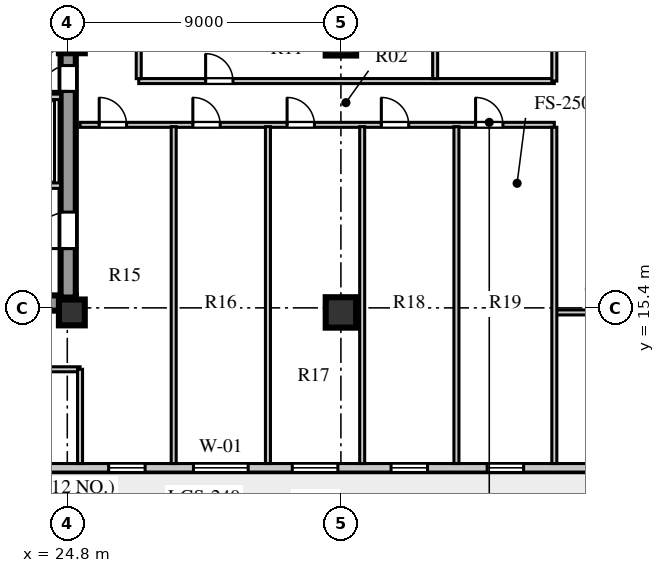
"""IFC4 building model, lengths in metres.
Left out: names, types, materials, properties, quantities, classifications, styles, units other than length and angle.
Written with IfcOpenShell. Run it as: python <this file> out.ifc"""

import sys

from ifc_helpers import new_model, si_unit, direction, frame, frame_2d, origin, origin_2d, place, context, subcontext, project, spatial, rectangle, extrude, element, fill, save


model = new_model("IFC4")
c1 = context("Model", 3, precision=1e-05, world=origin(), true_north=direction((0.0, 1.0)))
c2 = subcontext(c1, "Body", "Model", "MODEL_VIEW")
j1 = project(units=[si_unit("LENGTHUNIT", "METRE"), si_unit("PLANEANGLEUNIT", "RADIAN")], contexts=[c1])
p1 = place(None, origin())
s1 = spatial("IfcSite", under=j1, at=p1, CompositionType="ELEMENT")
p2 = place(p1, origin())
s2 = spatial("IfcBuilding", under=s1, at=p2, CompositionType="ELEMENT")
p3 = place(p2, frame((0.0, 0.0, 142.5)))
s3 = spatial("IfcBuildingStorey", under=s2, at=p3, CompositionType="ELEMENT", Elevation=142.5)
p4 = place(p3, frame((15.4, 15.56, 0.0), z_axis=(0.0, 0.0, 1.0), x_axis=(1.0, 0.0, 0.0)))
e1 = element("IfcWall", 1, at=p4, inside=s3, PredefinedType="SHEAR", context=c2, shape_type="SweptSolid", body=[
    extrude(rectangle(XDim=9.68, YDim=0.5, at=frame_2d((4.84, 0.0))), origin(), (0.0, 0.0, 1.0), 3.6),
])
p5 = place(p3, frame((24.83, 15.74, 0.0), z_axis=(0.0, 0.0, 1.0), x_axis=(0.0, 1.0, 0.0)))
e2 = element("IfcWall", 2, at=p5, inside=s3, PredefinedType="SHEAR", context=c2, shape_type="SweptSolid", body=[
    extrude(rectangle(XDim=25.76, YDim=0.5, at=frame_2d((12.88, 0.0))), origin(), (0.0, 0.0, 1.0), 3.6),
])
p6 = place(p5, frame((1.61, 0.0, 0.0)))
e3 = element("IfcOpeningElement", 3, at=p6, cuts=e2, PredefinedType="OPENING", context=c2, shape_type="SweptSolid", body=[
    extrude(rectangle(XDim=1.2, YDim=2.1, at=frame_2d((0.6, 1.05))), frame((0.0, 0.26, 0.0), z_axis=(0.0, -1.0, 0.0), x_axis=(1.0, 0.0, 0.0)), (0.0, 0.0, 1.0), 0.52),
])
p7 = place(p5, frame((6.78, 0.0, 0.0)))
e4 = element("IfcOpeningElement", 4, at=p7, cuts=e2, PredefinedType="OPENING", context=c2, shape_type="SweptSolid", body=[
    extrude(rectangle(XDim=0.85, YDim=2.06, at=frame_2d((0.425, 1.03))), frame((0.0, 0.26, 0.0), z_axis=(0.0, -1.0, 0.0), x_axis=(1.0, 0.0, 0.0)), (0.0, 0.0, 1.0), 0.52),
])
p8 = place(p5, frame((12.11, 0.0, 0.0)))
e5 = element("IfcOpeningElement", 5, at=p8, cuts=e2, PredefinedType="OPENING", context=c2, shape_type="SweptSolid", body=[
    extrude(rectangle(XDim=1.5, YDim=2.12, at=frame_2d((0.75, 1.06))), frame((0.0, 0.26, 0.0), z_axis=(0.0, -1.0, 0.0), x_axis=(1.0, 0.0, 0.0)), (0.0, 0.0, 1.0), 0.52),
])
p9 = place(p5, frame((20.11, 0.0, 0.0)))
e6 = element("IfcOpeningElement", 6, at=p9, cuts=e2, PredefinedType="OPENING", context=c2, shape_type="SweptSolid", body=[
    extrude(rectangle(XDim=1.2, YDim=2.12, at=frame_2d((0.6, 1.06))), frame((0.0, 0.26, 0.0), z_axis=(0.0, -1.0, 0.0), x_axis=(1.0, 0.0, 0.0)), (0.0, 0.0, 1.0), 0.52),
])
p10 = place(p5, frame((24.01, 0.0, 0.0)))
e7 = element("IfcOpeningElement", 7, at=p10, cuts=e2, PredefinedType="OPENING", context=c2, shape_type="SweptSolid", body=[
    extrude(rectangle(XDim=0.95, YDim=2.1, at=frame_2d((0.475, 1.05))), frame((0.0, 0.26, 0.0), z_axis=(0.0, -1.0, 0.0), x_axis=(1.0, 0.0, 0.0)), (0.0, 0.0, 1.0), 0.52),
])
for number, where, z_axis, x_axis in (
    (8, (24.95, 15.25, 0.0), (0.0, 0.0, 1.0), (1.0, 0.0, 0.0)),
    (9, (24.95, 24.2, 0.0), (0.0, 0.0, 1.0), (1.0, 0.0, 0.0)),
):
    element("IfcColumn", number, at=place(p3, frame(where, z_axis=z_axis, x_axis=x_axis)), inside=s3, PredefinedType="COLUMN", context=c2, shape_type="SweptSolid", body=[
        extrude(rectangle(XDim=0.85, YDim=0.85, at=origin_2d()), origin(), (0.0, 0.0, 1.0), 3.6),
    ])
for number, where, z_axis, x_axis in (
    (10, (33.8, 15.25, 0.0), (0.0, 0.0, 1.0), (1.0, 0.0, 0.0)),
    (11, (33.8, 24.2, 0.0), (0.0, 0.0, 1.0), (1.0, 0.0, 0.0)),
):
    element("IfcColumn", number, at=place(p3, frame(where, z_axis=z_axis, x_axis=x_axis)), inside=s3, PredefinedType="COLUMN", context=c2, shape_type="SweptSolid", body=[
        extrude(rectangle(XDim=1.0, YDim=1.0, at=origin_2d()), origin(), (0.0, 0.0, 1.0), 3.6),
    ])
p11 = place(p3, frame((13.25, 10.14, 0.0), z_axis=(0.0, 0.0, 1.0), x_axis=(1.0, 0.0, 0.0)))
e12 = element("IfcWall", 12, at=p11, inside=s3, PredefinedType="STANDARD", context=c2, shape_type="SweptSolid", body=[
    extrude(rectangle(XDim=32.1, YDim=0.28, at=frame_2d((16.05, 0.0))), origin(), (0.0, 0.0, 1.0), 3.6),
])
p12 = place(p11, frame((0.95, 0.0, 0.0)))
e13 = element("IfcOpeningElement", 13, at=p12, cuts=e12, PredefinedType="OPENING", context=c2, shape_type="SweptSolid", body=[
    extrude(rectangle(XDim=1.0, YDim=2.05, at=frame_2d((0.5, 1.025))), frame((0.0, 0.15, 0.0), z_axis=(0.0, -1.0, 0.0), x_axis=(1.0, 0.0, 0.0)), (0.0, 0.0, 1.0), 0.3),
])
p13 = place(p11, frame((5.955, 0.0, 0.8)))
e14 = element("IfcOpeningElement", 14, at=p13, cuts=e12, PredefinedType="OPENING", context=c2, shape_type="SweptSolid", body=[
    extrude(rectangle(XDim=1.95, YDim=2.0, at=frame_2d((0.975, 1.0))), frame((0.0, 0.15, 0.0), z_axis=(0.0, -1.0, 0.0), x_axis=(1.0, 0.0, 0.0)), (0.0, 0.0, 1.0), 0.3),
])
p14 = place(p11, frame((12.91, 0.0, 0.8)))
e15 = element("IfcOpeningElement", 15, at=p14, cuts=e12, PredefinedType="OPENING", context=c2, shape_type="SweptSolid", body=[
    extrude(rectangle(XDim=1.2, YDim=1.75, at=frame_2d((0.6, 0.875))), frame((0.0, 0.15, 0.0), z_axis=(0.0, -1.0, 0.0), x_axis=(1.0, 0.0, 0.0)), (0.0, 0.0, 1.0), 0.3),
])
p15 = place(p11, frame((15.7, 0.0, 0.8)))
e16 = element("IfcOpeningElement", 16, at=p15, cuts=e12, PredefinedType="OPENING", context=c2, shape_type="SweptSolid", body=[
    extrude(rectangle(XDim=1.8, YDim=2.0, at=frame_2d((0.9, 1.0))), frame((0.0, 0.15, 0.0), z_axis=(0.0, -1.0, 0.0), x_axis=(1.0, 0.0, 0.0)), (0.0, 0.0, 1.0), 0.3),
])
p16 = place(p11, frame((18.95, 0.0, 0.8)))
e17 = element("IfcOpeningElement", 17, at=p16, cuts=e12, PredefinedType="OPENING", context=c2, shape_type="SweptSolid", body=[
    extrude(rectangle(XDim=1.5, YDim=2.0, at=frame_2d((0.75, 1.0))), frame((0.0, 0.15, 0.0), z_axis=(0.0, -1.0, 0.0), x_axis=(1.0, 0.0, 0.0)), (0.0, 0.0, 1.0), 0.3),
])
p17 = place(p11, frame((22.2, 0.0, 0.8)))
e18 = element("IfcOpeningElement", 18, at=p17, cuts=e12, PredefinedType="OPENING", context=c2, shape_type="SweptSolid", body=[
    extrude(rectangle(XDim=1.2, YDim=1.75, at=frame_2d((0.6, 0.875))), frame((0.0, 0.15, 0.0), z_axis=(0.0, -1.0, 0.0), x_axis=(1.0, 0.0, 0.0)), (0.0, 0.0, 1.0), 0.3),
])
p18 = place(p11, frame((25.36, 0.0, 0.8)))
e19 = element("IfcOpeningElement", 19, at=p18, cuts=e12, PredefinedType="OPENING", context=c2, shape_type="SweptSolid", body=[
    extrude(rectangle(XDim=1.2, YDim=1.75, at=frame_2d((0.6, 0.875))), frame((0.0, 0.15, 0.0), z_axis=(0.0, -1.0, 0.0), x_axis=(1.0, 0.0, 0.0)), (0.0, 0.0, 1.0), 0.3),
])
p19 = place(p11, frame((28.73, 0.0, 0.8)))
e20 = element("IfcOpeningElement", 20, at=p19, cuts=e12, PredefinedType="OPENING", context=c2, shape_type="SweptSolid", body=[
    extrude(rectangle(XDim=2.1, YDim=1.95, at=frame_2d((1.05, 0.975))), frame((0.0, 0.15, 0.0), z_axis=(0.0, -1.0, 0.0), x_axis=(1.0, 0.0, 0.0)), (0.0, 0.0, 1.0), 0.3),
])
p20 = place(p3, frame((19.64, 19.42, 0.0), z_axis=(0.0, 0.0, 1.0), x_axis=(1.0, 0.0, 0.0)))
e21 = element("IfcWall", 21, at=p20, inside=s3, PredefinedType="SOLIDWALL", context=c2, shape_type="SweptSolid", body=[
    extrude(rectangle(XDim=4.94, YDim=0.18, at=frame_2d((2.47, 0.0))), origin(), (0.0, 0.0, 1.0), 3.6),
])
p21 = place(p20, frame((0.72, 0.0, 0.0)))
e22 = element("IfcOpeningElement", 22, at=p21, cuts=e21, PredefinedType="OPENING", context=c2, shape_type="SweptSolid", body=[
    extrude(rectangle(XDim=1.1, YDim=2.1, at=frame_2d((0.55, 1.05))), frame((0.0, 0.1, 0.0), z_axis=(0.0, -1.0, 0.0), x_axis=(1.0, 0.0, 0.0)), (0.0, 0.0, 1.0), 0.2),
])
p22 = place(p20, frame((3.02, 0.0, 0.0)))
e23 = element("IfcOpeningElement", 23, at=p22, cuts=e21, PredefinedType="OPENING", context=c2, shape_type="SweptSolid", body=[
    extrude(rectangle(XDim=1.1, YDim=2.1, at=frame_2d((0.55, 1.05))), frame((0.0, 0.1, 0.0), z_axis=(0.0, -1.0, 0.0), x_axis=(1.0, 0.0, 0.0)), (0.0, 0.0, 1.0), 0.2),
])
p23 = place(p3, frame((19.64, 22.34, 0.0), z_axis=(0.0, 0.0, 1.0), x_axis=(1.0, 0.0, 0.0)))
e24 = element("IfcWall", 24, at=p23, inside=s3, PredefinedType="SOLIDWALL", context=c2, shape_type="SweptSolid", body=[
    extrude(rectangle(XDim=4.94, YDim=0.18, at=frame_2d((2.47, 0.0))), origin(), (0.0, 0.0, 1.0), 3.6),
])
p24 = place(p3, frame((25.22, 21.42, 0.0), z_axis=(0.0, 0.0, 1.0), x_axis=(1.0, 0.0, 0.0)))
e25 = element("IfcWall", 25, at=p24, inside=s3, PredefinedType="PARTITIONING", context=c2, shape_type="SweptSolid", body=[
    extrude(rectangle(XDim=15.6, YDim=0.165, at=frame_2d((7.8, 0.0))), origin(), (0.0, 0.0, 1.0), 3.2),
])
p25 = place(p24, frame((0.63, 0.0, 0.0)))
e26 = element("IfcOpeningElement", 26, at=p25, cuts=e25, PredefinedType="OPENING", context=c2, shape_type="SweptSolid", body=[
    extrude(rectangle(XDim=0.9, YDim=2.08, at=frame_2d((0.45, 1.04))), frame((0.0, 0.093, 0.0), z_axis=(0.0, -1.0, 0.0), x_axis=(1.0, 0.0, 0.0)), (0.0, 0.0, 1.0), 0.185),
])
p26 = place(p24, frame((3.71, 0.0, 0.0)))
e27 = element("IfcOpeningElement", 27, at=p26, cuts=e25, PredefinedType="OPENING", context=c2, shape_type="SweptSolid", body=[
    extrude(rectangle(XDim=0.9, YDim=2.08, at=frame_2d((0.45, 1.04))), frame((0.0, 0.093, 0.0), z_axis=(0.0, -1.0, 0.0), x_axis=(1.0, 0.0, 0.0)), (0.0, 0.0, 1.0), 0.185),
])
p27 = place(p24, frame((6.81, 0.0, 0.0)))
e28 = element("IfcOpeningElement", 28, at=p27, cuts=e25, PredefinedType="OPENING", context=c2, shape_type="SweptSolid", body=[
    extrude(rectangle(XDim=0.9, YDim=2.08, at=frame_2d((0.45, 1.04))), frame((0.0, 0.093, 0.0), z_axis=(0.0, -1.0, 0.0), x_axis=(1.0, 0.0, 0.0)), (0.0, 0.0, 1.0), 0.185),
])
p28 = place(p24, frame((9.91, 0.0, 0.0)))
e29 = element("IfcOpeningElement", 29, at=p28, cuts=e25, PredefinedType="OPENING", context=c2, shape_type="SweptSolid", body=[
    extrude(rectangle(XDim=0.9, YDim=2.08, at=frame_2d((0.45, 1.04))), frame((0.0, 0.093, 0.0), z_axis=(0.0, -1.0, 0.0), x_axis=(1.0, 0.0, 0.0)), (0.0, 0.0, 1.0), 0.185),
])
p29 = place(p24, frame((13.01, 0.0, 0.0)))
e30 = element("IfcOpeningElement", 30, at=p29, cuts=e25, PredefinedType="OPENING", context=c2, shape_type="SweptSolid", body=[
    extrude(rectangle(XDim=0.9, YDim=2.08, at=frame_2d((0.45, 1.04))), frame((0.0, 0.093, 0.0), z_axis=(0.0, -1.0, 0.0), x_axis=(1.0, 0.0, 0.0)), (0.0, 0.0, 1.0), 0.185),
])
p30 = place(p3, frame((27.15, 22.86, 0.0), z_axis=(0.0, 0.0, 1.0), x_axis=(1.0, 0.0, 0.0)))
e31 = element("IfcWall", 31, at=p30, inside=s3, PredefinedType="PARTITIONING", context=c2, shape_type="SweptSolid", body=[
    extrude(rectangle(XDim=13.67, YDim=0.165, at=frame_2d((6.835, 0.0))), origin(), (0.0, 0.0, 1.0), 3.6),
])
p31 = place(p30, frame((2.2, 0.0, 0.0)))
e32 = element("IfcOpeningElement", 32, at=p31, cuts=e31, PredefinedType="OPENING", context=c2, shape_type="SweptSolid", body=[
    extrude(rectangle(XDim=0.9, YDim=2.08, at=frame_2d((0.45, 1.04))), frame((0.0, 0.093, 0.0), z_axis=(0.0, -1.0, 0.0), x_axis=(1.0, 0.0, 0.0)), (0.0, 0.0, 1.0), 0.185),
])
p32 = place(p3, frame((40.82, 15.25, 0.0), z_axis=(0.0, 0.0, 1.0), x_axis=(1.0, 0.0, 0.0)))
e33 = element("IfcWall", 33, at=p32, inside=s3, PredefinedType="PARTITIONING", context=c2, shape_type="SweptSolid", body=[
    extrude(rectangle(XDim=7.3, YDim=0.165, at=frame_2d((3.65, 0.0))), origin(), (0.0, 0.0, 1.0), 2.95),
])
p33 = place(p3, frame((40.82, 22.86, 0.0), z_axis=(0.0, 0.0, 1.0), x_axis=(0.0, 1.0, 0.0)))
e34 = element("IfcWall", 34, at=p33, inside=s3, PredefinedType="PARTITIONING", context=c2, shape_type="SweptSolid", body=[
    extrude(rectangle(XDim=4.36, YDim=0.165, at=frame_2d((2.18, 0.0))), origin(), (0.0, 0.0, 1.0), 3.6),
])
p34 = place(p33, frame((1.4, 0.0, 0.0)))
e35 = element("IfcOpeningElement", 35, at=p34, cuts=e34, PredefinedType="OPENING", context=c2, shape_type="SweptSolid", body=[
    extrude(rectangle(XDim=0.95, YDim=2.1, at=frame_2d((0.475, 1.05))), frame((0.0, 0.093, 0.0), z_axis=(0.0, -1.0, 0.0), x_axis=(1.0, 0.0, 0.0)), (0.0, 0.0, 1.0), 0.185),
])
p35 = place(p3, frame((13.59, 13.38, 0.0), z_axis=(0.0, 0.0, 1.0), x_axis=(1.0, 0.0, 0.0)))
e36 = element("IfcWall", 36, at=p35, inside=s3, PredefinedType="PARTITIONING", context=c2, shape_type="SweptSolid", body=[
    extrude(rectangle(XDim=11.63, YDim=0.165, at=frame_2d((5.815, 0.0))), origin(), (0.0, 0.0, 1.0), 3.6),
])
p36 = place(p35, frame((4.56, 0.0, 0.0)))
e37 = element("IfcOpeningElement", 37, at=p36, cuts=e36, PredefinedType="OPENING", context=c2, shape_type="SweptSolid", body=[
    extrude(rectangle(XDim=1.0, YDim=2.08, at=frame_2d((0.5, 1.04))), frame((0.0, 0.093, 0.0), z_axis=(0.0, -1.0, 0.0), x_axis=(1.0, 0.0, 0.0)), (0.0, 0.0, 1.0), 0.185),
])
p37 = place(p3, frame((25.22, 10.28, 0.0), z_axis=(0.0, 0.0, 1.0), x_axis=(0.0, 1.0, 0.0)))
e38 = element("IfcWall", 38, at=p37, inside=s3, PredefinedType="PARTITIONING", context=c2, shape_type="SweptSolid", body=[
    extrude(rectangle(XDim=3.1, YDim=0.165, at=frame_2d((1.55, 0.0))), origin(), (0.0, 0.0, 1.0), 3.1),
])
p38 = place(p3, frame((36.9, 22.94, 0.0), z_axis=(0.0, 0.0, 1.0), x_axis=(0.0, 1.0, 0.0)))
e39 = element("IfcWall", 39, at=p38, inside=s3, PredefinedType="PARTITIONING", context=c2, shape_type="SweptSolid", body=[
    extrude(rectangle(XDim=4.28, YDim=0.165, at=frame_2d((2.14, 0.0))), origin(), (0.0, 0.0, 1.0), 3.6),
])
p39 = place(p3, frame((27.15, 22.94, 0.0), z_axis=(0.0, 0.0, 1.0), x_axis=(0.0, 1.0, 0.0)))
e40 = element("IfcWall", 40, at=p39, inside=s3, PredefinedType="PARTITIONING", context=c2, shape_type="SweptSolid", body=[
    extrude(rectangle(XDim=1.94, YDim=0.165, at=frame_2d((0.97, 0.0))), origin(), (0.0, 0.0, 1.0), 3.6),
])
p40 = place(p3, frame((40.82, 10.28, 0.0), z_axis=(0.0, 0.0, 1.0), x_axis=(0.0, 1.0, 0.0)))
e41 = element("IfcWall", 41, at=p40, inside=s3, PredefinedType="PARTITIONING", context=c2, shape_type="SweptSolid", body=[
    extrude(rectangle(XDim=11.06, YDim=0.165, at=frame_2d((5.53, 0.0))), origin(), (0.0, 0.0, 1.0), 3.6),
])
for number, where, z_axis, x_axis in (
    (42, (28.3, 10.28, 0.0), (0.0, 0.0, 1.0), (0.0, 1.0, 0.0)),
    (43, (31.4, 10.28, 0.0), (0.0, 0.0, 1.0), (0.0, 1.0, 0.0)),
    (44, (34.5, 10.28, 0.0), (0.0, 0.0, 1.0), (0.0, 1.0, 0.0)),
    (45, (37.6, 10.28, 0.0), (0.0, 0.0, 1.0), (0.0, 1.0, 0.0)),
):
    element("IfcWall", number, at=place(p3, frame(where, z_axis=z_axis, x_axis=x_axis)), inside=s3, PredefinedType="PARTITIONING", context=c2, shape_type="SweptSolid", body=[
        extrude(rectangle(XDim=11.08, YDim=0.165, at=frame_2d((5.54, 0.0))), origin(), (0.0, 0.0, 1.0), 3.6),
    ])
p41 = place(p14, origin())
e46 = element("IfcWindow", 46, at=p41, inside=s3, PartitioningType="SINGLE_PANEL", PredefinedType="WINDOW", context=c2, shape_type="SweptSolid", body=[
    extrude(rectangle(XDim=1.2, YDim=1.75, at=frame_2d((0.6, 0.875))), frame((0.0, 0.03, 0.0), z_axis=(0.0, -1.0, 0.0), x_axis=(1.0, 0.0, 0.0)), (0.0, 0.0, 1.0), 0.06),
])
fill(e15, e46)
p42 = place(p15, origin())
e47 = element("IfcWindow", 47, at=p42, inside=s3, PartitioningType="SINGLE_PANEL", PredefinedType="WINDOW", context=c2, shape_type="SweptSolid", body=[
    extrude(rectangle(XDim=1.8, YDim=2.0, at=frame_2d((0.9, 1.0))), frame((0.0, 0.03, 0.0), z_axis=(0.0, -1.0, 0.0), x_axis=(1.0, 0.0, 0.0)), (0.0, 0.0, 1.0), 0.06),
])
fill(e16, e47)
p43 = place(p16, origin())
e48 = element("IfcWindow", 48, at=p43, inside=s3, PartitioningType="SINGLE_PANEL", PredefinedType="WINDOW", context=c2, shape_type="SweptSolid", body=[
    extrude(rectangle(XDim=1.5, YDim=2.0, at=frame_2d((0.75, 1.0))), frame((0.0, 0.03, 0.0), z_axis=(0.0, -1.0, 0.0), x_axis=(1.0, 0.0, 0.0)), (0.0, 0.0, 1.0), 0.06),
])
fill(e17, e48)
p44 = place(p17, origin())
e49 = element("IfcWindow", 49, at=p44, inside=s3, PartitioningType="SINGLE_PANEL", PredefinedType="WINDOW", context=c2, shape_type="SweptSolid", body=[
    extrude(rectangle(XDim=1.2, YDim=1.75, at=frame_2d((0.6, 0.875))), frame((0.0, 0.03, 0.0), z_axis=(0.0, -1.0, 0.0), x_axis=(1.0, 0.0, 0.0)), (0.0, 0.0, 1.0), 0.06),
])
fill(e18, e49)
p45 = place(p18, origin())
e50 = element("IfcWindow", 50, at=p45, inside=s3, PartitioningType="SINGLE_PANEL", PredefinedType="WINDOW", context=c2, shape_type="SweptSolid", body=[
    extrude(rectangle(XDim=1.2, YDim=1.75, at=frame_2d((0.6, 0.875))), frame((0.0, 0.03, 0.0), z_axis=(0.0, -1.0, 0.0), x_axis=(1.0, 0.0, 0.0)), (0.0, 0.0, 1.0), 0.06),
])
fill(e19, e50)
p46 = place(p6, frame((1.2, 0.0, 0.0), z_axis=(0.0, 0.0, 1.0), x_axis=(-1.0, 0.0, 0.0)))
e51 = element("IfcDoor", 51, at=p46, inside=s3, OperationType="SINGLE_SWING_RIGHT", PredefinedType="DOOR", context=c2, shape_type="SweptSolid", body=[
    extrude(rectangle(XDim=1.2, YDim=2.1, at=frame_2d((0.6, 1.05))), frame((0.0, 0.025, 0.0), z_axis=(0.0, -1.0, 0.0), x_axis=(1.0, 0.0, 0.0)), (0.0, 0.0, 1.0), 0.05),
])
fill(e3, e51)
p47 = place(p7, frame((0.85, 0.0, 0.0), z_axis=(0.0, 0.0, 1.0), x_axis=(-1.0, 0.0, 0.0)))
e52 = element("IfcDoor", 52, at=p47, inside=s3, OperationType="SINGLE_SWING_RIGHT", PredefinedType="DOOR", context=c2, shape_type="SweptSolid", body=[
    extrude(rectangle(XDim=0.85, YDim=2.06, at=frame_2d((0.425, 1.03))), frame((0.0, 0.025, 0.0), z_axis=(0.0, -1.0, 0.0), x_axis=(1.0, 0.0, 0.0)), (0.0, 0.0, 1.0), 0.05),
])
fill(e4, e52)
p48 = place(p31, origin())
e53 = element("IfcDoor", 53, at=p48, inside=s3, OperationType="SINGLE_SWING_LEFT", PredefinedType="DOOR", context=c2, shape_type="SweptSolid", body=[
    extrude(rectangle(XDim=0.9, YDim=2.08, at=frame_2d((0.45, 1.04))), frame((0.0, 0.025, 0.0), z_axis=(0.0, -1.0, 0.0), x_axis=(1.0, 0.0, 0.0)), (0.0, 0.0, 1.0), 0.05),
])
fill(e32, e53)
p49 = place(p25, frame((0.9, 0.0, 0.0), z_axis=(0.0, 0.0, 1.0), x_axis=(-1.0, 0.0, 0.0)))
e54 = element("IfcDoor", 54, at=p49, inside=s3, OperationType="SINGLE_SWING_RIGHT", PredefinedType="DOOR", context=c2, shape_type="SweptSolid", body=[
    extrude(rectangle(XDim=0.9, YDim=2.08, at=frame_2d((0.45, 1.04))), frame((0.0, 0.025, 0.0), z_axis=(0.0, -1.0, 0.0), x_axis=(1.0, 0.0, 0.0)), (0.0, 0.0, 1.0), 0.05),
])
fill(e26, e54)
p50 = place(p26, frame((0.9, 0.0, 0.0), z_axis=(0.0, 0.0, 1.0), x_axis=(-1.0, 0.0, 0.0)))
e55 = element("IfcDoor", 55, at=p50, inside=s3, OperationType="SINGLE_SWING_RIGHT", PredefinedType="DOOR", context=c2, shape_type="SweptSolid", body=[
    extrude(rectangle(XDim=0.9, YDim=2.08, at=frame_2d((0.45, 1.04))), frame((0.0, 0.025, 0.0), z_axis=(0.0, -1.0, 0.0), x_axis=(1.0, 0.0, 0.0)), (0.0, 0.0, 1.0), 0.05),
])
fill(e27, e55)
p51 = place(p27, frame((0.9, 0.0, 0.0), z_axis=(0.0, 0.0, 1.0), x_axis=(-1.0, 0.0, 0.0)))
e56 = element("IfcDoor", 56, at=p51, inside=s3, OperationType="SINGLE_SWING_RIGHT", PredefinedType="DOOR", context=c2, shape_type="SweptSolid", body=[
    extrude(rectangle(XDim=0.9, YDim=2.08, at=frame_2d((0.45, 1.04))), frame((0.0, 0.025, 0.0), z_axis=(0.0, -1.0, 0.0), x_axis=(1.0, 0.0, 0.0)), (0.0, 0.0, 1.0), 0.05),
])
fill(e28, e56)
p52 = place(p28, frame((0.9, 0.0, 0.0), z_axis=(0.0, 0.0, 1.0), x_axis=(-1.0, 0.0, 0.0)))
e57 = element("IfcDoor", 57, at=p52, inside=s3, OperationType="SINGLE_SWING_RIGHT", PredefinedType="DOOR", context=c2, shape_type="SweptSolid", body=[
    extrude(rectangle(XDim=0.9, YDim=2.08, at=frame_2d((0.45, 1.04))), frame((0.0, 0.025, 0.0), z_axis=(0.0, -1.0, 0.0), x_axis=(1.0, 0.0, 0.0)), (0.0, 0.0, 1.0), 0.05),
])
fill(e29, e57)
p53 = place(p29, frame((0.9, 0.0, 0.0), z_axis=(0.0, 0.0, 1.0), x_axis=(-1.0, 0.0, 0.0)))
e58 = element("IfcDoor", 58, at=p53, inside=s3, OperationType="SINGLE_SWING_RIGHT", PredefinedType="DOOR", context=c2, shape_type="SweptSolid", body=[
    extrude(rectangle(XDim=0.9, YDim=2.08, at=frame_2d((0.45, 1.04))), frame((0.0, 0.025, 0.0), z_axis=(0.0, -1.0, 0.0), x_axis=(1.0, 0.0, 0.0)), (0.0, 0.0, 1.0), 0.05),
])
fill(e30, e58)
save(model, sys.argv[1])
